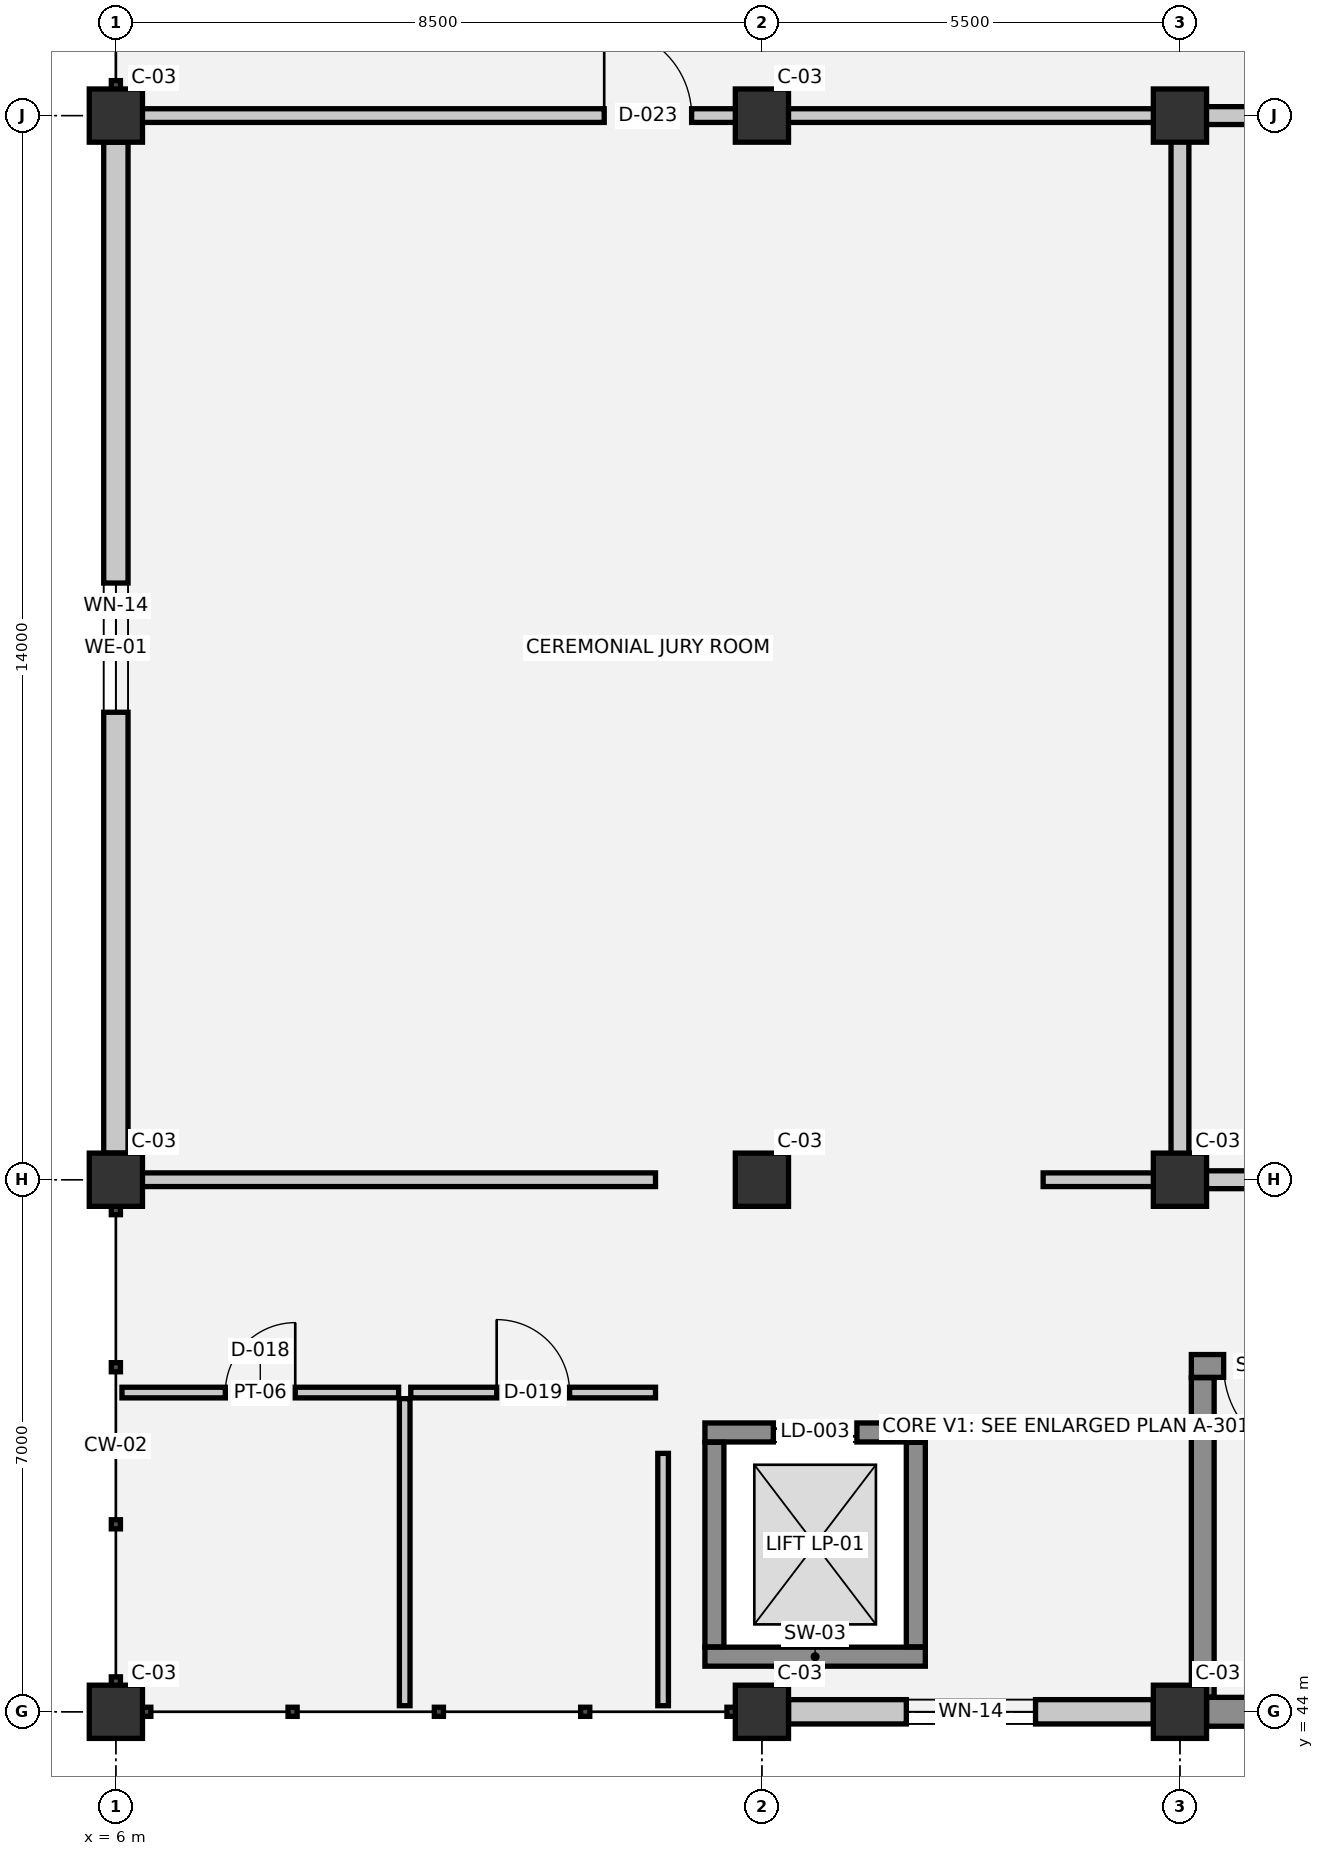
"""IFC4 building model, lengths in metres.
Left out: names, types, materials, properties, quantities, classifications, styles, units other than length and angle.
Written with IfcOpenShell. Run it as: python <this file> out.ifc"""

import sys

from ifc_helpers import new_model, si_unit, direction, frame, frame_2d, origin, origin_2d, place, context, subcontext, project, spatial, rectangle, extrude, element, fill, save


model = new_model("IFC4")
c1 = context("Model", 3, precision=1e-05, world=origin(), true_north=direction((0.0, 1.0)))
c2 = subcontext(c1, "Body", "Model", "MODEL_VIEW")
j1 = project(units=[si_unit("LENGTHUNIT", "METRE"), si_unit("PLANEANGLEUNIT", "RADIAN")], contexts=[c1])
p1 = place(None, origin())
s1 = spatial("IfcSite", under=j1, at=p1, CompositionType="ELEMENT")
p2 = place(p1, origin())
s2 = spatial("IfcBuilding", under=s1, at=p2, CompositionType="ELEMENT")
p3 = place(p2, frame((0.0, 0.0, 5.4)))
s3 = spatial("IfcBuildingStorey", under=s2, at=p3, CompositionType="ELEMENT", Elevation=5.4)
for number, where, z_axis, x_axis in (
    (1, (6.0, 44.0, 0.0), (0.0, 0.0, 1.0), (1.0, 0.0, 0.0)),
    (2, (6.0, 51.0, 0.0), (0.0, 0.0, 1.0), (1.0, 0.0, 0.0)),
    (3, (6.0, 65.0, 0.0), (0.0, 0.0, 1.0), (1.0, 0.0, 0.0)),
    (4, (14.5, 44.0, 0.0), (0.0, 0.0, 1.0), (1.0, 0.0, 0.0)),
    (5, (14.5, 51.0, 0.0), (0.0, 0.0, 1.0), (1.0, 0.0, 0.0)),
    (6, (14.5, 65.0, 0.0), (0.0, 0.0, 1.0), (1.0, 0.0, 0.0)),
    (7, (20.0, 44.0, 0.0), (0.0, 0.0, 1.0), (1.0, 0.0, 0.0)),
    (8, (20.0, 51.0, 0.0), (0.0, 0.0, 1.0), (1.0, 0.0, 0.0)),
    (9, (20.0, 65.0, 0.0), (0.0, 0.0, 1.0), (1.0, 0.0, 0.0)),
):
    element("IfcColumn", number, at=place(p3, frame(where, z_axis=z_axis, x_axis=x_axis)), inside=s3, PredefinedType="COLUMN", context=c2, shape_type="SweptSolid", body=[
        extrude(rectangle(XDim=0.7, YDim=0.7, at=origin_2d()), origin(), (0.0, 0.0, 1.0), 4.5),
    ])
p4 = place(p3, frame((6.0, 51.35, 0.0), z_axis=(0.0, 0.0, 1.0), x_axis=(0.0, 1.0, 0.0)))
e10 = element("IfcWall", 10, at=p4, inside=s3, PredefinedType="SOLIDWALL", context=c2, shape_type="SweptSolid", body=[
    extrude(rectangle(XDim=13.3, YDim=0.32, at=frame_2d((6.65, 0.0))), origin(), (0.0, 0.0, 1.0), 3.11),
])
p5 = place(p4, frame((5.8, 0.0, 0.9)))
e11 = element("IfcOpeningElement", 11, at=p5, cuts=e10, PredefinedType="OPENING", context=c2, shape_type="SweptSolid", body=[
    extrude(rectangle(XDim=1.7, YDim=1.9, at=frame_2d((0.85, 0.95))), frame((0.0, 0.17, 0.0), z_axis=(0.0, -1.0, 0.0), x_axis=(1.0, 0.0, 0.0)), (0.0, 0.0, 1.0), 0.34),
])
p6 = place(p3, frame((34.65, 44.0, 0.0), z_axis=(0.0, 0.0, 1.0), x_axis=(-1.0, 0.0, 0.0)))
e12 = element("IfcWall", 12, at=p6, inside=s3, PredefinedType="STANDARD", context=c2, shape_type="SweptSolid", body=[
    extrude(rectangle(XDim=14.3, YDim=0.38, at=frame_2d((7.15, 0.0))), origin(), (0.0, 0.0, 1.0), 3.11),
])
p7 = place(p6, frame((5.58, 0.0, 0.95)))
e13 = element("IfcOpeningElement", 13, at=p7, cuts=e12, PredefinedType="OPENING", context=c2, shape_type="SweptSolid", body=[
    extrude(rectangle(XDim=0.85, YDim=1.55, at=frame_2d((0.425, 0.775))), frame((0.0, 0.2, 0.0), z_axis=(0.0, -1.0, 0.0), x_axis=(1.0, 0.0, 0.0)), (0.0, 0.0, 1.0), 0.4),
])
p8 = place(p3, frame((19.65, 44.0, 0.0), z_axis=(0.0, 0.0, 1.0), x_axis=(-1.0, 0.0, 0.0)))
e14 = element("IfcWall", 14, at=p8, inside=s3, PredefinedType="SOLIDWALL", context=c2, shape_type="SweptSolid", body=[
    extrude(rectangle(XDim=4.8, YDim=0.32, at=frame_2d((2.4, 0.0))), origin(), (0.0, 0.0, 1.0), 3.11),
])
p9 = place(p8, frame((1.55, 0.0, 0.9)))
e15 = element("IfcOpeningElement", 15, at=p9, cuts=e14, PredefinedType="OPENING", context=c2, shape_type="SweptSolid", body=[
    extrude(rectangle(XDim=1.7, YDim=1.9, at=frame_2d((0.85, 0.95))), frame((0.0, 0.17, 0.0), z_axis=(0.0, -1.0, 0.0), x_axis=(1.0, 0.0, 0.0)), (0.0, 0.0, 1.0), 0.34),
])
p10 = place(p3, frame((13.75, 44.725, 0.0), z_axis=(0.0, 0.0, 1.0), x_axis=(1.0, 0.0, 0.0)))
e16 = element("IfcWall", 16, at=p10, inside=s3, PredefinedType="SHEAR", context=c2, shape_type="SweptSolid", body=[
    extrude(rectangle(XDim=2.9, YDim=0.25, at=frame_2d((1.45, 0.0))), origin(), (0.0, 0.0, 1.0), 4.5),
])
p11 = place(p3, frame((16.65, 47.675, 0.0), z_axis=(0.0, 0.0, 1.0), x_axis=(-1.0, 0.0, 0.0)))
e17 = element("IfcWall", 17, at=p11, inside=s3, PredefinedType="SHEAR", context=c2, shape_type="SweptSolid", body=[
    extrude(rectangle(XDim=2.9, YDim=0.25, at=frame_2d((1.45, 0.0))), origin(), (0.0, 0.0, 1.0), 4.5),
])
p12 = place(p11, frame((0.9, 0.0, 0.0)))
e18 = element("IfcOpeningElement", 18, at=p12, cuts=e17, PredefinedType="OPENING", context=c2, shape_type="SweptSolid", body=[
    extrude(rectangle(XDim=1.1, YDim=2.15, at=frame_2d((0.55, 1.075))), frame((0.0, 0.135, 0.0), z_axis=(0.0, -1.0, 0.0), x_axis=(1.0, 0.0, 0.0)), (0.0, 0.0, 1.0), 0.27),
])
for number, where, z_axis, x_axis in (
    (19, (13.875, 47.545, 0.0), (0.0, 0.0, 1.0), (0.0, -1.0, 0.0)),
    (20, (16.525, 44.855, 0.0), (0.0, 0.0, 1.0), (0.0, 1.0, 0.0)),
):
    element("IfcWall", number, at=place(p3, frame(where, z_axis=z_axis, x_axis=x_axis)), inside=s3, PredefinedType="SHEAR", context=c2, shape_type="SweptSolid", body=[
        extrude(rectangle(XDim=2.69, YDim=0.25, at=frame_2d((1.345, 0.0))), origin(), (0.0, 0.0, 1.0), 4.5),
    ])
p13 = place(p3, frame((27.85, 48.55, 0.0), z_axis=(0.0, 0.0, 1.0), x_axis=(-1.0, 0.0, 0.0)))
e21 = element("IfcWall", 21, at=p13, inside=s3, PredefinedType="SHEAR", context=c2, shape_type="SweptSolid", body=[
    extrude(rectangle(XDim=7.7, YDim=0.3, at=frame_2d((3.85, 0.0))), origin(), (0.0, 0.0, 1.0), 4.24),
])
p14 = place(p13, frame((6.025, 0.0, 0.0)))
e22 = element("IfcOpeningElement", 22, at=p14, cuts=e21, PredefinedType="OPENING", context=c2, shape_type="SweptSolid", body=[
    extrude(rectangle(XDim=1.25, YDim=2.15, at=frame_2d((0.625, 1.075))), frame((0.0, 0.16, 0.0), z_axis=(0.0, -1.0, 0.0), x_axis=(1.0, 0.0, 0.0)), (0.0, 0.0, 1.0), 0.32),
])
p15 = place(p3, frame((20.3, 48.395, 0.0), z_axis=(0.0, 0.0, 1.0), x_axis=(0.0, -1.0, 0.0)))
e23 = element("IfcWall", 23, at=p15, inside=s3, PredefinedType="SHEAR", context=c2, shape_type="SweptSolid", body=[
    extrude(rectangle(XDim=4.2, YDim=0.3, at=frame_2d((2.1, 0.0))), origin(), (0.0, 0.0, 1.0), 4.24),
])
p16 = place(p3, frame((6.08, 48.2, 0.0), z_axis=(0.0, 0.0, 1.0), x_axis=(1.0, 0.0, 0.0)))
e24 = element("IfcWall", 24, at=p16, inside=s3, PredefinedType="PLUMBINGWALL", context=c2, shape_type="SweptSolid", body=[
    extrude(rectangle(XDim=3.64, YDim=0.14, at=frame_2d((1.82, 0.0))), origin(), (0.0, 0.0, 1.0), 4.14),
])
p17 = place(p16, frame((1.36, 0.0, 0.0)))
e25 = element("IfcOpeningElement", 25, at=p17, cuts=e24, PredefinedType="OPENING", context=c2, shape_type="SweptSolid", body=[
    extrude(rectangle(XDim=0.92, YDim=2.1, at=frame_2d((0.46, 1.05))), frame((0.0, 0.08, 0.0), z_axis=(0.0, -1.0, 0.0), x_axis=(1.0, 0.0, 0.0)), (0.0, 0.0, 1.0), 0.16),
])
p18 = place(p3, frame((9.88, 48.2, 0.0), z_axis=(0.0, 0.0, 1.0), x_axis=(1.0, 0.0, 0.0)))
e26 = element("IfcWall", 26, at=p18, inside=s3, PredefinedType="PLUMBINGWALL", context=c2, shape_type="SweptSolid", body=[
    extrude(rectangle(XDim=3.22, YDim=0.14, at=frame_2d((1.61, 0.0))), origin(), (0.0, 0.0, 1.0), 4.14),
])
p19 = place(p18, frame((1.13, 0.0, 0.0)))
e27 = element("IfcOpeningElement", 27, at=p19, cuts=e26, PredefinedType="OPENING", context=c2, shape_type="SweptSolid", body=[
    extrude(rectangle(XDim=0.96, YDim=2.1, at=frame_2d((0.48, 1.05))), frame((0.0, 0.08, 0.0), z_axis=(0.0, -1.0, 0.0), x_axis=(1.0, 0.0, 0.0)), (0.0, 0.0, 1.0), 0.16),
])
p20 = place(p3, frame((6.08, 51.0, 0.0), z_axis=(0.0, 0.0, 1.0), x_axis=(1.0, 0.0, 0.0)))
e28 = element("IfcWall", 28, at=p20, inside=s3, PredefinedType="PARTITIONING", context=c2, shape_type="SweptSolid", body=[
    extrude(rectangle(XDim=7.02, YDim=0.18, at=frame_2d((3.51, 0.0))), origin(), (0.0, 0.0, 1.0), 3.53),
])
p21 = place(p3, frame((18.2, 51.0, 0.0), z_axis=(0.0, 0.0, 1.0), x_axis=(1.0, 0.0, 0.0)))
e29 = element("IfcWall", 29, at=p21, inside=s3, PredefinedType="PARTITIONING", context=c2, shape_type="SweptSolid", body=[
    extrude(rectangle(XDim=1.72, YDim=0.18, at=frame_2d((0.86, 0.0))), origin(), (0.0, 0.0, 1.0), 3.53),
])
p22 = place(p3, frame((20.08, 51.0, 0.0), z_axis=(0.0, 0.0, 1.0), x_axis=(1.0, 0.0, 0.0)))
e30 = element("IfcWall", 30, at=p22, inside=s3, PredefinedType="PARTITIONING", context=c2, shape_type="SweptSolid", body=[
    extrude(rectangle(XDim=21.84, YDim=0.235, at=frame_2d((10.92, 0.0))), origin(), (0.0, 0.0, 1.0), 3.28),
])
p23 = place(p22, frame((9.92, 0.0, 0.0)))
e31 = element("IfcOpeningElement", 31, at=p23, cuts=e30, PredefinedType="OPENING", context=c2, shape_type="SweptSolid", body=[
    extrude(rectangle(XDim=2.0, YDim=2.35, at=frame_2d((1.0, 1.175))), frame((0.0, 0.127, 0.0), z_axis=(0.0, -1.0, 0.0), x_axis=(1.0, 0.0, 0.0)), (0.0, 0.0, 1.0), 0.255),
])
p24 = place(p3, frame((6.08, 65.0, 0.0), z_axis=(0.0, 0.0, 1.0), x_axis=(1.0, 0.0, 0.0)))
e32 = element("IfcWall", 32, at=p24, inside=s3, PredefinedType="PARTITIONING", context=c2, shape_type="SweptSolid", body=[
    extrude(rectangle(XDim=13.84, YDim=0.18, at=frame_2d((6.92, 0.0))), origin(), (0.0, 0.0, 1.0), 3.53),
])
p25 = place(p24, frame((6.345, 0.0, 0.0)))
e33 = element("IfcOpeningElement", 33, at=p25, cuts=e32, PredefinedType="OPENING", context=c2, shape_type="SweptSolid", body=[
    extrude(rectangle(XDim=1.15, YDim=2.2, at=frame_2d((0.575, 1.1))), frame((0.0, 0.1, 0.0), z_axis=(0.0, -1.0, 0.0), x_axis=(1.0, 0.0, 0.0)), (0.0, 0.0, 1.0), 0.2),
])
p26 = place(p3, frame((20.08, 65.0, 0.0), z_axis=(0.0, 0.0, 1.0), x_axis=(1.0, 0.0, 0.0)))
e34 = element("IfcWall", 34, at=p26, inside=s3, PredefinedType="PARTITIONING", context=c2, shape_type="SweptSolid", body=[
    extrude(rectangle(XDim=21.84, YDim=0.235, at=frame_2d((10.92, 0.0))), origin(), (0.0, 0.0, 1.0), 3.28),
])
p27 = place(p3, frame((9.8, 44.08, 0.0), z_axis=(0.0, 0.0, 1.0), x_axis=(0.0, 1.0, 0.0)))
e35 = element("IfcWall", 35, at=p27, inside=s3, PredefinedType="PLUMBINGWALL", context=c2, shape_type="SweptSolid", body=[
    extrude(rectangle(XDim=4.04, YDim=0.14, at=frame_2d((2.02, 0.0))), origin(), (0.0, 0.0, 1.0), 4.14),
])
p28 = place(p3, frame((13.2, 44.08, 0.0), z_axis=(0.0, 0.0, 1.0), x_axis=(0.0, 1.0, 0.0)))
e36 = element("IfcWall", 36, at=p28, inside=s3, PredefinedType="PLUMBINGWALL", context=c2, shape_type="SweptSolid", body=[
    extrude(rectangle(XDim=3.32, YDim=0.14, at=frame_2d((1.66, 0.0))), origin(), (0.0, 0.0, 1.0), 4.14),
])
p29 = place(p3, frame((20.0, 51.08, 0.0), z_axis=(0.0, 0.0, 1.0), x_axis=(0.0, 1.0, 0.0)))
e37 = element("IfcWall", 37, at=p29, inside=s3, PredefinedType="PARTITIONING", context=c2, shape_type="SweptSolid", body=[
    extrude(rectangle(XDim=13.84, YDim=0.235, at=frame_2d((6.92, 0.0))), origin(), (0.0, 0.0, 1.0), 3.13),
])
p30 = place(p5, origin())
e38 = element("IfcWindow", 38, at=p30, inside=s3, PartitioningType="SINGLE_PANEL", PredefinedType="WINDOW", context=c2, shape_type="SweptSolid", body=[
    extrude(rectangle(XDim=1.7, YDim=1.9, at=frame_2d((0.85, 0.95))), frame((0.0, 0.03, 0.0), z_axis=(0.0, -1.0, 0.0), x_axis=(1.0, 0.0, 0.0)), (0.0, 0.0, 1.0), 0.06),
])
fill(e11, e38)
p31 = place(p9, origin())
e39 = element("IfcWindow", 39, at=p31, inside=s3, PartitioningType="SINGLE_PANEL", PredefinedType="WINDOW", context=c2, shape_type="SweptSolid", body=[
    extrude(rectangle(XDim=1.7, YDim=1.9, at=frame_2d((0.85, 0.95))), frame((0.0, 0.03, 0.0), z_axis=(0.0, -1.0, 0.0), x_axis=(1.0, 0.0, 0.0)), (0.0, 0.0, 1.0), 0.06),
])
fill(e15, e39)
p32 = place(p12, origin())
e40 = element("IfcDoor", 40, at=p32, inside=s3, OperationType="DOUBLE_DOOR_SLIDING", PredefinedType="DOOR", context=c2, shape_type="SweptSolid", body=[
    extrude(rectangle(XDim=1.1, YDim=2.15, at=frame_2d((0.55, 1.075))), frame((0.0, 0.025, 0.0), z_axis=(0.0, -1.0, 0.0), x_axis=(1.0, 0.0, 0.0)), (0.0, 0.0, 1.0), 0.05),
])
fill(e18, e40)
p33 = place(p14, origin())
e41 = element("IfcDoor", 41, at=p33, inside=s3, OperationType="SINGLE_SWING_LEFT", PredefinedType="DOOR", context=c2, shape_type="SweptSolid", body=[
    extrude(rectangle(XDim=1.25, YDim=2.15, at=frame_2d((0.625, 1.075))), frame((0.0, 0.025, 0.0), z_axis=(0.0, -1.0, 0.0), x_axis=(1.0, 0.0, 0.0)), (0.0, 0.0, 1.0), 0.05),
])
fill(e22, e41)
p34 = place(p17, origin())
e42 = element("IfcDoor", 42, at=p34, inside=s3, OperationType="SINGLE_SWING_RIGHT", PredefinedType="DOOR", context=c2, shape_type="SweptSolid", body=[
    extrude(rectangle(XDim=0.92, YDim=2.1, at=frame_2d((0.46, 1.05))), frame((0.0, 0.025, 0.0), z_axis=(0.0, -1.0, 0.0), x_axis=(1.0, 0.0, 0.0)), (0.0, 0.0, 1.0), 0.05),
])
fill(e25, e42)
p35 = place(p19, origin())
e43 = element("IfcDoor", 43, at=p35, inside=s3, OperationType="SINGLE_SWING_LEFT", PredefinedType="DOOR", context=c2, shape_type="SweptSolid", body=[
    extrude(rectangle(XDim=0.96, YDim=2.1, at=frame_2d((0.48, 1.05))), frame((0.0, 0.025, 0.0), z_axis=(0.0, -1.0, 0.0), x_axis=(1.0, 0.0, 0.0)), (0.0, 0.0, 1.0), 0.05),
])
fill(e27, e43)
p36 = place(p25, origin())
e44 = element("IfcDoor", 44, at=p36, inside=s3, OperationType="SINGLE_SWING_LEFT", PredefinedType="DOOR", context=c2, shape_type="SweptSolid", body=[
    extrude(rectangle(XDim=1.15, YDim=2.2, at=frame_2d((0.575, 1.1))), frame((0.0, 0.025, 0.0), z_axis=(0.0, -1.0, 0.0), x_axis=(1.0, 0.0, 0.0)), (0.0, 0.0, 1.0), 0.05),
])
fill(e33, e44)
save(model, sys.argv[1])
